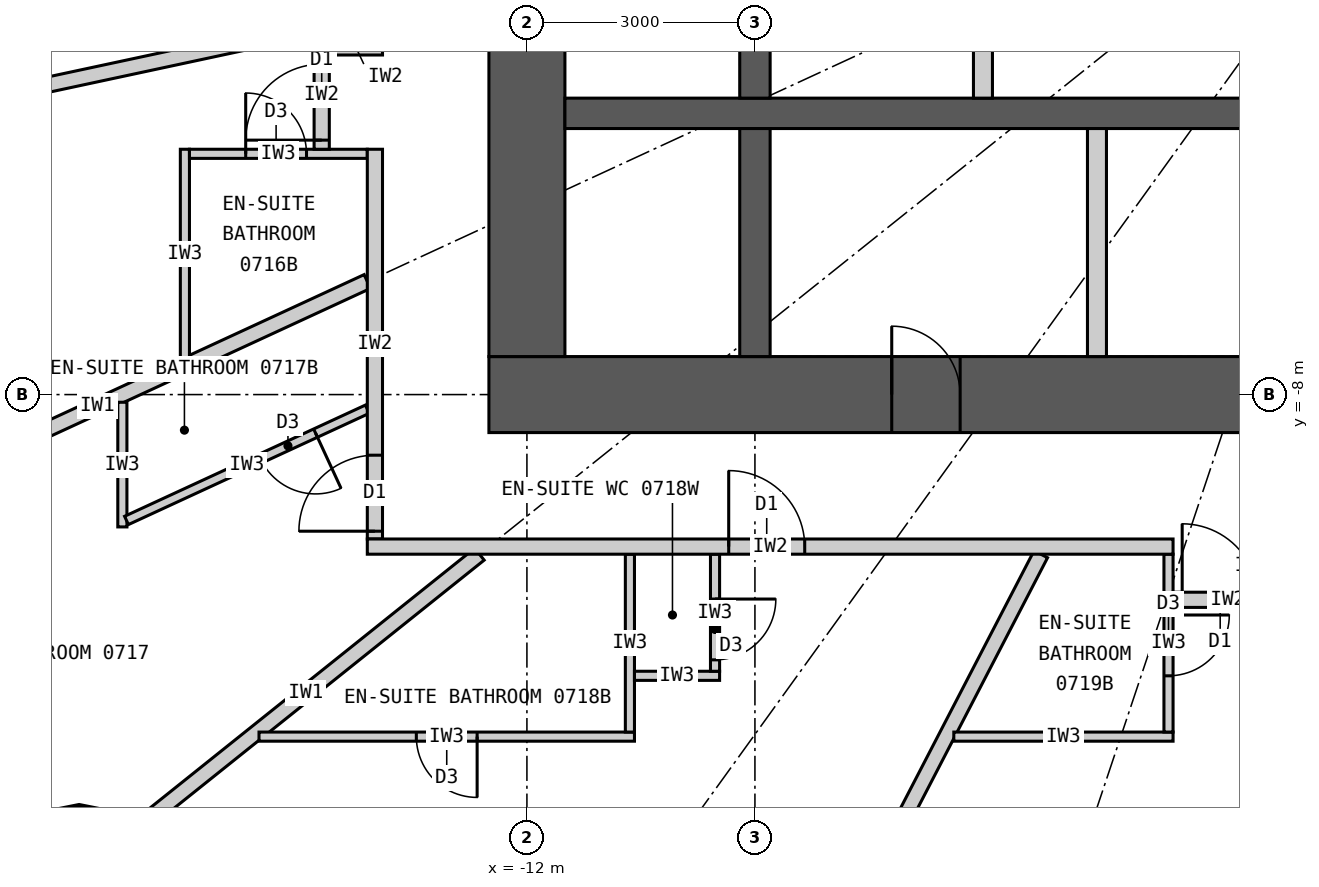
"""IFC4 building model, lengths in metres.
Left out: names, types, materials, properties, quantities, classifications, styles, units other than length and angle.
Written with IfcOpenShell. Run it as: python <this file> out.ifc"""

import sys

from ifc_helpers import new_model, si_unit, direction, frame, frame_2d, origin, origin_2d, place, context, subcontext, project, spatial, rectangle, circle, extrude, element, fill, save


model = new_model("IFC4")
c1 = context("Model", 3, precision=1e-05, world=origin(), true_north=direction((0.0, 1.0)))
c2 = subcontext(c1, "Body", "Model", "MODEL_VIEW")
j1 = project(units=[si_unit("LENGTHUNIT", "METRE"), si_unit("PLANEANGLEUNIT", "RADIAN")], contexts=[c1])
p1 = place(None, origin())
s1 = spatial("IfcSite", under=j1, at=p1, CompositionType="ELEMENT")
p2 = place(p1, origin())
s2 = spatial("IfcBuilding", under=s1, at=p2, CompositionType="ELEMENT")
p3 = place(p2, frame((0.0, 0.0, 36.0)))
s3 = spatial("IfcBuildingStorey", under=s2, at=p3, CompositionType="ELEMENT", Elevation=36.0)
p4 = place(p3, frame((-17.892, -14.313, 0.0), z_axis=(0.0, 0.0, 1.0), x_axis=(1.0, 0.0, 0.0)))
e1 = element("IfcColumn", 1, at=p4, inside=s3, PredefinedType="COLUMN", context=c2, shape_type="SweptSolid", body=[
    extrude(circle(Radius=0.9, at=origin_2d()), origin(), (0.0, 0.0, 1.0), 3.3),
])
p5 = place(p3, frame((12.5, -8.0, 0.0), z_axis=(0.0, 0.0, 1.0), x_axis=(-1.0, 0.0, 0.0)))
e2 = element("IfcWall", 2, at=p5, inside=s3, PredefinedType="SHEAR", context=c2, shape_type="SweptSolid", body=[
    extrude(rectangle(XDim=25.0, YDim=1.0, at=frame_2d((12.5, 0.0))), origin(), (0.0, 0.0, 1.0), 3.3),
])
p6 = place(p5, frame((11.2, 0.0, 0.0)))
e3 = element("IfcOpeningElement", 3, at=p6, cuts=e2, PredefinedType="OPENING", context=c2, shape_type="SweptSolid", body=[
    extrude(rectangle(XDim=1.2, YDim=2.2, at=frame_2d((0.6, 1.1))), frame((0.0, 0.51, 0.0), z_axis=(0.0, -1.0, 0.0), x_axis=(1.0, 0.0, 0.0)), (0.0, 0.0, 1.0), 1.02),
])
p7 = place(p5, frame((18.8, 0.0, 0.0)))
e4 = element("IfcOpeningElement", 4, at=p7, cuts=e2, PredefinedType="OPENING", context=c2, shape_type="SweptSolid", body=[
    extrude(rectangle(XDim=0.9, YDim=2.2, at=frame_2d((0.45, 1.1))), frame((0.0, 0.51, 0.0), z_axis=(0.0, -1.0, 0.0), x_axis=(1.0, 0.0, 0.0)), (0.0, 0.0, 1.0), 1.02),
])
p8 = place(p3, frame((-12.0, 7.5, 0.0), z_axis=(0.0, 0.0, 1.0), x_axis=(0.0, -1.0, 0.0)))
e5 = element("IfcWall", 5, at=p8, inside=s3, PredefinedType="SHEAR", context=c2, shape_type="SweptSolid", body=[
    extrude(rectangle(XDim=15.0, YDim=1.0, at=frame_2d((7.5, 0.0))), origin(), (0.0, 0.0, 1.0), 3.3),
])
p9 = place(p8, frame((6.6, 0.0, 0.0)))
e6 = element("IfcOpeningElement", 6, at=p9, cuts=e5, PredefinedType="OPENING", context=c2, shape_type="SweptSolid", body=[
    extrude(rectangle(XDim=1.8, YDim=2.2, at=frame_2d((0.9, 1.1))), frame((0.0, 0.51, 0.0), z_axis=(0.0, -1.0, 0.0), x_axis=(1.0, 0.0, 0.0)), (0.0, 0.0, 1.0), 1.02),
])
p10 = place(p3, frame((-11.5, -4.3, 0.0), z_axis=(0.0, 0.0, 1.0), x_axis=(1.0, 0.0, 0.0)))
e7 = element("IfcWall", 7, at=p10, inside=s3, PredefinedType="SHEAR", context=c2, shape_type="SweptSolid", body=[
    extrude(rectangle(XDim=23.0, YDim=0.4, at=frame_2d((11.5, 0.0))), origin(), (0.0, 0.0, 1.0), 3.3),
])
p11 = place(p3, frame((-9.0, -4.1, 0.0), z_axis=(0.0, 0.0, 1.0), x_axis=(0.0, 1.0, 0.0)))
e8 = element("IfcWall", 8, at=p11, inside=s3, PredefinedType="SHEAR", context=c2, shape_type="SweptSolid", body=[
    extrude(rectangle(XDim=2.35, YDim=0.4, at=frame_2d((1.175, 0.0))), origin(), (0.0, 0.0, 1.0), 3.3),
])
p12 = place(p3, frame((-9.0, -7.5, 0.0), z_axis=(0.0, 0.0, 1.0), x_axis=(0.0, 1.0, 0.0)))
e9 = element("IfcWall", 9, at=p12, inside=s3, PredefinedType="SHEAR", context=c2, shape_type="SweptSolid", body=[
    extrude(rectangle(XDim=3.0, YDim=0.4, at=frame_2d((1.5, 0.0))), origin(), (0.0, 0.0, 1.0), 3.3),
])
p13 = place(p3, frame((-4.5, -7.5, 0.0), z_axis=(0.0, 0.0, 1.0), x_axis=(0.0, 1.0, 0.0)))
e10 = element("IfcWall", 10, at=p13, inside=s3, PredefinedType="PARTITIONING", context=c2, shape_type="SweptSolid", body=[
    extrude(rectangle(XDim=3.0, YDim=0.25, at=frame_2d((1.5, 0.0))), origin(), (0.0, 0.0, 1.0), 3.3),
])
p14 = place(p3, frame((-6.0, -4.1, 0.0), z_axis=(0.0, 0.0, 1.0), x_axis=(0.0, 1.0, 0.0)))
e11 = element("IfcWall", 11, at=p14, inside=s3, PredefinedType="PARTITIONING", context=c2, shape_type="SweptSolid", body=[
    extrude(rectangle(XDim=2.35, YDim=0.25, at=frame_2d((1.175, 0.0))), origin(), (0.0, 0.0, 1.0), 3.3),
])
p15 = place(p3, frame((-14.1, -3.022, 0.0), z_axis=(0.0, 0.0, 1.0), x_axis=(-0.977786510688, -0.209603290805, 0.0)))
e12 = element("IfcWall", 12, at=p15, inside=s3, PredefinedType="PARTITIONING", context=c2, shape_type="SweptSolid", body=[
    extrude(rectangle(XDim=9.887, YDim=0.2, at=frame_2d((4.943, 0.0))), origin(), (0.0, 0.0, 1.0), 2.32),
])
p16 = place(p3, frame((-14.1, -6.512, 0.0), z_axis=(0.0, 0.0, 1.0), x_axis=(-0.907842433118, -0.41931147925, 0.0)))
e13 = element("IfcWall", 13, at=p16, inside=s3, PredefinedType="PARTITIONING", context=c2, shape_type="SweptSolid", body=[
    extrude(rectangle(XDim=7.823, YDim=0.2, at=frame_2d((3.912, 0.0))), origin(), (0.0, 0.0, 1.0), 2.32),
])
p17 = place(p3, frame((-12.625, -10.1, 0.0), z_axis=(0.0, 0.0, 1.0), x_axis=(-0.780872884676, -0.624689953479, 0.0)))
e14 = element("IfcWall", 14, at=p17, inside=s3, PredefinedType="PARTITIONING", context=c2, shape_type="SweptSolid", body=[
    extrude(rectangle(XDim=5.845, YDim=0.2, at=frame_2d((2.922, 0.0))), origin(), (0.0, 0.0, 1.0), 2.32),
])
p18 = place(p3, frame((-5.239, -10.1, 0.0), z_axis=(0.0, 0.0, 1.0), x_axis=(-0.460422783389, -0.887699758103, 0.0)))
e15 = element("IfcWall", 15, at=p18, inside=s3, PredefinedType="PARTITIONING", context=c2, shape_type="SweptSolid", body=[
    extrude(rectangle(XDim=10.12, YDim=0.2, at=frame_2d((5.06, 0.0))), origin(), (0.0, 0.0, 1.0), 3.12),
])
p19 = place(p3, frame((-1.665, -10.1, 0.0), z_axis=(0.0, 0.0, 1.0), x_axis=(-0.162657606458, -0.986682574621, 0.0)))
e16 = element("IfcWall", 16, at=p19, inside=s3, PredefinedType="PARTITIONING", context=c2, shape_type="SweptSolid", body=[
    extrude(rectangle(XDim=10.505, YDim=0.2, at=frame_2d((5.252, 0.0))), origin(), (0.0, 0.0, 1.0), 3.12),
])
p20 = place(p3, frame((-16.5, -7.521, 0.0), z_axis=(0.0, 0.0, 1.0), x_axis=(0.0, 1.0, 0.0)))
e17 = element("IfcWall", 17, at=p20, inside=s3, PredefinedType="PARTITIONING", context=c2, shape_type="SweptSolid", body=[
    extrude(rectangle(XDim=2.749, YDim=0.12, at=frame_2d((1.374, 0.0))), origin(), (0.0, 0.0, 1.0), 3.12),
])
p21 = place(p3, frame((-14.1, -4.833, 0.0), z_axis=(0.0, 0.0, 1.0), x_axis=(-1.0, 0.0, 0.0)))
e18 = element("IfcWall", 18, at=p21, inside=s3, PredefinedType="PARTITIONING", context=c2, shape_type="SweptSolid", body=[
    extrude(rectangle(XDim=2.34, YDim=0.12, at=frame_2d((1.17, 0.0))), origin(), (0.0, 0.0, 1.0), 3.12),
])
p22 = place(p21, frame((0.8, 0.0, 0.0)))
e19 = element("IfcOpeningElement", 19, at=p22, cuts=e18, PredefinedType="OPENING", context=c2, shape_type="SweptSolid", body=[
    extrude(rectangle(XDim=0.8, YDim=2.1, at=frame_2d((0.4, 1.05))), frame((0.0, 0.07, 0.0), z_axis=(0.0, -1.0, 0.0), x_axis=(1.0, 0.0, 0.0)), (0.0, 0.0, 1.0), 0.14),
])
p23 = place(p3, frame((-17.323, -8.101, 0.0), z_axis=(0.0, 0.0, 1.0), x_axis=(0.0, -1.0, 0.0)))
e20 = element("IfcWall", 20, at=p23, inside=s3, PredefinedType="PARTITIONING", context=c2, shape_type="SweptSolid", body=[
    extrude(rectangle(XDim=1.64, YDim=0.12, at=frame_2d((0.82, 0.0))), origin(), (0.0, 0.0, 1.0), 3.12),
])
p24 = place(p3, frame((-14.1, -8.193, 0.0), z_axis=(0.0, 0.0, 1.0), x_axis=(-0.907836493557, -0.419324338628, 0.0)))
e21 = element("IfcWall", 21, at=p24, inside=s3, PredefinedType="PARTITIONING", context=c2, shape_type="SweptSolid", body=[
    extrude(rectangle(XDim=3.49, YDim=0.12, at=frame_2d((1.745, 0.0))), origin(), (0.0, 0.0, 1.0), 3.12),
])
p25 = place(p24, frame((0.75, 0.0, 0.0)))
e22 = element("IfcOpeningElement", 22, at=p25, cuts=e21, PredefinedType="OPENING", context=c2, shape_type="SweptSolid", body=[
    extrude(rectangle(XDim=0.8, YDim=2.1, at=frame_2d((0.4, 1.05))), frame((0.0, 0.07, 0.0), z_axis=(0.0, -1.0, 0.0), x_axis=(1.0, 0.0, 0.0)), (0.0, 0.0, 1.0), 0.14),
])
p26 = place(p3, frame((-15.525, -12.5, 0.0), z_axis=(0.0, 0.0, 1.0), x_axis=(1.0, 0.0, 0.0)))
e23 = element("IfcWall", 23, at=p26, inside=s3, PredefinedType="PARTITIONING", context=c2, shape_type="SweptSolid", body=[
    extrude(rectangle(XDim=4.94, YDim=0.12, at=frame_2d((2.47, 0.0))), origin(), (0.0, 0.0, 1.0), 3.12),
])
p27 = place(p26, frame((2.07, 0.0, 0.0)))
e24 = element("IfcOpeningElement", 24, at=p27, cuts=e23, PredefinedType="OPENING", context=c2, shape_type="SweptSolid", body=[
    extrude(rectangle(XDim=0.8, YDim=2.1, at=frame_2d((0.4, 1.05))), frame((0.0, 0.07, 0.0), z_axis=(0.0, -1.0, 0.0), x_axis=(1.0, 0.0, 0.0)), (0.0, 0.0, 1.0), 0.14),
])
p28 = place(p3, frame((-10.645, -10.1, 0.0), z_axis=(0.0, 0.0, 1.0), x_axis=(0.0, -1.0, 0.0)))
e25 = element("IfcWall", 25, at=p28, inside=s3, PredefinedType="PARTITIONING", context=c2, shape_type="SweptSolid", body=[
    extrude(rectangle(XDim=2.34, YDim=0.12, at=frame_2d((1.17, 0.0))), origin(), (0.0, 0.0, 1.0), 3.12),
])
p29 = place(p3, frame((-10.585, -11.7, 0.0), z_axis=(0.0, 0.0, 1.0), x_axis=(1.0, 0.0, 0.0)))
e26 = element("IfcWall", 26, at=p29, inside=s3, PredefinedType="PARTITIONING", context=c2, shape_type="SweptSolid", body=[
    extrude(rectangle(XDim=1.12, YDim=0.12, at=frame_2d((0.56, 0.0))), origin(), (0.0, 0.0, 1.0), 3.12),
])
p30 = place(p3, frame((-9.525, -10.1, 0.0), z_axis=(0.0, 0.0, 1.0), x_axis=(0.0, -1.0, 0.0)))
e27 = element("IfcWall", 27, at=p30, inside=s3, PredefinedType="PARTITIONING", context=c2, shape_type="SweptSolid", body=[
    extrude(rectangle(XDim=1.54, YDim=0.12, at=frame_2d((0.77, 0.0))), origin(), (0.0, 0.0, 1.0), 3.12),
])
p31 = place(p30, frame((0.59, 0.0, 0.0)))
e28 = element("IfcOpeningElement", 28, at=p31, cuts=e27, PredefinedType="OPENING", context=c2, shape_type="SweptSolid", body=[
    extrude(rectangle(XDim=0.8, YDim=2.1, at=frame_2d((0.4, 1.05))), frame((0.0, 0.07, 0.0), z_axis=(0.0, -1.0, 0.0), x_axis=(1.0, 0.0, 0.0)), (0.0, 0.0, 1.0), 0.14),
])
p32 = place(p3, frame((-6.383, -12.5, 0.0), z_axis=(0.0, 0.0, 1.0), x_axis=(1.0, 0.0, 0.0)))
e29 = element("IfcWall", 29, at=p32, inside=s3, PredefinedType="PARTITIONING", context=c2, shape_type="SweptSolid", body=[
    extrude(rectangle(XDim=2.885, YDim=0.12, at=frame_2d((1.442, 0.0))), origin(), (0.0, 0.0, 1.0), 3.12),
])
p33 = place(p3, frame((-3.559, -10.1, 0.0), z_axis=(0.0, 0.0, 1.0), x_axis=(0.0, -1.0, 0.0)))
e30 = element("IfcWall", 30, at=p33, inside=s3, PredefinedType="PARTITIONING", context=c2, shape_type="SweptSolid", body=[
    extrude(rectangle(XDim=2.34, YDim=0.12, at=frame_2d((1.17, 0.0))), origin(), (0.0, 0.0, 1.0), 3.12),
])
p34 = place(p33, frame((0.8, 0.0, 0.0)))
e31 = element("IfcOpeningElement", 31, at=p34, cuts=e30, PredefinedType="OPENING", context=c2, shape_type="SweptSolid", body=[
    extrude(rectangle(XDim=0.8, YDim=2.1, at=frame_2d((0.4, 1.05))), frame((0.0, 0.07, 0.0), z_axis=(0.0, -1.0, 0.0), x_axis=(1.0, 0.0, 0.0)), (0.0, 0.0, 1.0), 0.14),
])
p35 = place(p3, frame((-14.7, -3.333, 0.0), z_axis=(0.0, 0.0, 1.0), x_axis=(0.0, -1.0, 0.0)))
e32 = element("IfcWall", 32, at=p35, inside=s3, PredefinedType="PARTITIONING", context=c2, shape_type="SweptSolid", body=[
    extrude(rectangle(XDim=1.44, YDim=0.2, at=frame_2d((0.72, 0.0))), origin(), (0.0, 0.0, 1.0), 3.12),
])
p36 = place(p35, frame((0.32, 0.0, 0.0)))
e33 = element("IfcOpeningElement", 33, at=p36, cuts=e32, PredefinedType="OPENING", context=c2, shape_type="SweptSolid", body=[
    extrude(rectangle(XDim=1.0, YDim=2.2, at=frame_2d((0.5, 1.1))), frame((0.0, 0.11, 0.0), z_axis=(0.0, -1.0, 0.0), x_axis=(1.0, 0.0, 0.0)), (0.0, 0.0, 1.0), 0.22),
])
p37 = place(p3, frame((-13.9, -3.433, 0.0), z_axis=(0.0, 0.0, 1.0), x_axis=(-1.0, 0.0, 0.0)))
e34 = element("IfcWall", 34, at=p37, inside=s3, PredefinedType="PARTITIONING", context=c2, shape_type="SweptSolid", body=[
    extrude(rectangle(XDim=0.7, YDim=0.2, at=frame_2d((0.35, 0.0))), origin(), (0.0, 0.0, 1.0), 2.32),
])
p38 = place(p3, frame((-2.059, -10.7, 0.0), z_axis=(0.0, 0.0, 1.0), x_axis=(-1.0, 0.0, 0.0)))
e35 = element("IfcWall", 35, at=p38, inside=s3, PredefinedType="PARTITIONING", context=c2, shape_type="SweptSolid", body=[
    extrude(rectangle(XDim=1.44, YDim=0.2, at=frame_2d((0.72, 0.0))), origin(), (0.0, 0.0, 1.0), 3.12),
])
p39 = place(p38, frame((0.32, 0.0, 0.0)))
e36 = element("IfcOpeningElement", 36, at=p39, cuts=e35, PredefinedType="OPENING", context=c2, shape_type="SweptSolid", body=[
    extrude(rectangle(XDim=1.0, YDim=2.2, at=frame_2d((0.5, 1.1))), frame((0.0, 0.11, 0.0), z_axis=(0.0, -1.0, 0.0), x_axis=(1.0, 0.0, 0.0)), (0.0, 0.0, 1.0), 0.22),
])
p40 = place(p3, frame((-14.0, -4.772, 0.0), z_axis=(0.0, 0.0, 1.0), x_axis=(0.0, -1.0, 0.0)))
e37 = element("IfcWall", 37, at=p40, inside=s3, PredefinedType="PARTITIONING", context=c2, shape_type="SweptSolid", body=[
    extrude(rectangle(XDim=5.127, YDim=0.2, at=frame_2d((2.564, 0.0))), origin(), (0.0, 0.0, 1.0), 3.12),
])
p41 = place(p40, frame((4.025, 0.0, 0.0)))
e38 = element("IfcOpeningElement", 38, at=p41, cuts=e37, PredefinedType="OPENING", context=c2, shape_type="SweptSolid", body=[
    extrude(rectangle(XDim=1.0, YDim=2.2, at=frame_2d((0.5, 1.1))), frame((0.0, 0.11, 0.0), z_axis=(0.0, -1.0, 0.0), x_axis=(1.0, 0.0, 0.0)), (0.0, 0.0, 1.0), 0.22),
])
p42 = place(p3, frame((-3.499, -10.0, 0.0), z_axis=(0.0, 0.0, 1.0), x_axis=(-1.0, 0.0, 0.0)))
e39 = element("IfcWall", 39, at=p42, inside=s3, PredefinedType="PARTITIONING", context=c2, shape_type="SweptSolid", body=[
    extrude(rectangle(XDim=10.602, YDim=0.2, at=frame_2d((5.301, 0.0))), origin(), (0.0, 0.0, 1.0), 3.12),
])
p43 = place(p42, frame((4.846, 0.0, 0.0)))
e40 = element("IfcOpeningElement", 40, at=p43, cuts=e39, PredefinedType="OPENING", context=c2, shape_type="SweptSolid", body=[
    extrude(rectangle(XDim=1.0, YDim=2.2, at=frame_2d((0.5, 1.1))), frame((0.0, 0.11, 0.0), z_axis=(0.0, -1.0, 0.0), x_axis=(1.0, 0.0, 0.0)), (0.0, 0.0, 1.0), 0.22),
])
p44 = place(p22, origin())
e41 = element("IfcDoor", 41, at=p44, inside=s3, OperationType="SINGLE_SWING_RIGHT", PredefinedType="DOOR", context=c2, shape_type="SweptSolid", body=[
    extrude(rectangle(XDim=0.8, YDim=2.1, at=frame_2d((0.4, 1.05))), frame((0.0, 0.025, 0.0), z_axis=(0.0, -1.0, 0.0), x_axis=(1.0, 0.0, 0.0)), (0.0, 0.0, 1.0), 0.05),
])
fill(e19, e41)
p45 = place(p36, origin())
e42 = element("IfcDoor", 42, at=p45, inside=s3, OperationType="SINGLE_SWING_RIGHT", PredefinedType="DOOR", context=c2, shape_type="SweptSolid", body=[
    extrude(rectangle(XDim=1.0, YDim=2.2, at=frame_2d((0.5, 1.1))), frame((0.0, 0.025, 0.0), z_axis=(0.0, -1.0, 0.0), x_axis=(1.0, 0.0, 0.0)), (0.0, 0.0, 1.0), 0.05),
])
fill(e33, e42)
p46 = place(p25, origin())
e43 = element("IfcDoor", 43, at=p46, inside=s3, OperationType="SINGLE_SWING_LEFT", PredefinedType="DOOR", context=c2, shape_type="SweptSolid", body=[
    extrude(rectangle(XDim=0.8, YDim=2.1, at=frame_2d((0.4, 1.05))), frame((0.0, 0.025, 0.0), z_axis=(0.0, -1.0, 0.0), x_axis=(1.0, 0.0, 0.0)), (0.0, 0.0, 1.0), 0.05),
])
fill(e22, e43)
p47 = place(p41, origin())
e44 = element("IfcDoor", 44, at=p47, inside=s3, OperationType="SINGLE_SWING_RIGHT", PredefinedType="DOOR", context=c2, shape_type="SweptSolid", body=[
    extrude(rectangle(XDim=1.0, YDim=2.2, at=frame_2d((0.5, 1.1))), frame((0.0, 0.025, 0.0), z_axis=(0.0, -1.0, 0.0), x_axis=(1.0, 0.0, 0.0)), (0.0, 0.0, 1.0), 0.05),
])
fill(e38, e44)
p48 = place(p27, origin())
e45 = element("IfcDoor", 45, at=p48, inside=s3, OperationType="SINGLE_SWING_RIGHT", PredefinedType="DOOR", context=c2, shape_type="SweptSolid", body=[
    extrude(rectangle(XDim=0.8, YDim=2.1, at=frame_2d((0.4, 1.05))), frame((0.0, 0.025, 0.0), z_axis=(0.0, -1.0, 0.0), x_axis=(1.0, 0.0, 0.0)), (0.0, 0.0, 1.0), 0.05),
])
fill(e24, e45)
p49 = place(p31, origin())
e46 = element("IfcDoor", 46, at=p49, inside=s3, OperationType="SINGLE_SWING_LEFT", PredefinedType="DOOR", context=c2, shape_type="SweptSolid", body=[
    extrude(rectangle(XDim=0.8, YDim=2.1, at=frame_2d((0.4, 1.05))), frame((0.0, 0.025, 0.0), z_axis=(0.0, -1.0, 0.0), x_axis=(1.0, 0.0, 0.0)), (0.0, 0.0, 1.0), 0.05),
])
fill(e28, e46)
p50 = place(p43, origin())
e47 = element("IfcDoor", 47, at=p50, inside=s3, OperationType="SINGLE_SWING_RIGHT", PredefinedType="DOOR", context=c2, shape_type="SweptSolid", body=[
    extrude(rectangle(XDim=1.0, YDim=2.2, at=frame_2d((0.5, 1.1))), frame((0.0, 0.025, 0.0), z_axis=(0.0, -1.0, 0.0), x_axis=(1.0, 0.0, 0.0)), (0.0, 0.0, 1.0), 0.05),
])
fill(e40, e47)
p51 = place(p34, origin())
e48 = element("IfcDoor", 48, at=p51, inside=s3, OperationType="SINGLE_SWING_LEFT", PredefinedType="DOOR", context=c2, shape_type="SweptSolid", body=[
    extrude(rectangle(XDim=0.8, YDim=2.1, at=frame_2d((0.4, 1.05))), frame((0.0, 0.025, 0.0), z_axis=(0.0, -1.0, 0.0), x_axis=(1.0, 0.0, 0.0)), (0.0, 0.0, 1.0), 0.05),
])
fill(e31, e48)
p52 = place(p39, origin())
e49 = element("IfcDoor", 49, at=p52, inside=s3, OperationType="SINGLE_SWING_RIGHT", PredefinedType="DOOR", context=c2, shape_type="SweptSolid", body=[
    extrude(rectangle(XDim=1.0, YDim=2.2, at=frame_2d((0.5, 1.1))), frame((0.0, 0.025, 0.0), z_axis=(0.0, -1.0, 0.0), x_axis=(1.0, 0.0, 0.0)), (0.0, 0.0, 1.0), 0.05),
])
fill(e36, e49)
p53 = place(p7, origin())
e50 = element("IfcDoor", 50, at=p53, inside=s3, OperationType="SINGLE_SWING_RIGHT", PredefinedType="DOOR", context=c2, shape_type="SweptSolid", body=[
    extrude(rectangle(XDim=0.9, YDim=2.2, at=frame_2d((0.45, 1.1))), frame((0.0, 0.025, 0.0), z_axis=(0.0, -1.0, 0.0), x_axis=(1.0, 0.0, 0.0)), (0.0, 0.0, 1.0), 0.05),
])
fill(e4, e50)
save(model, sys.argv[1])
